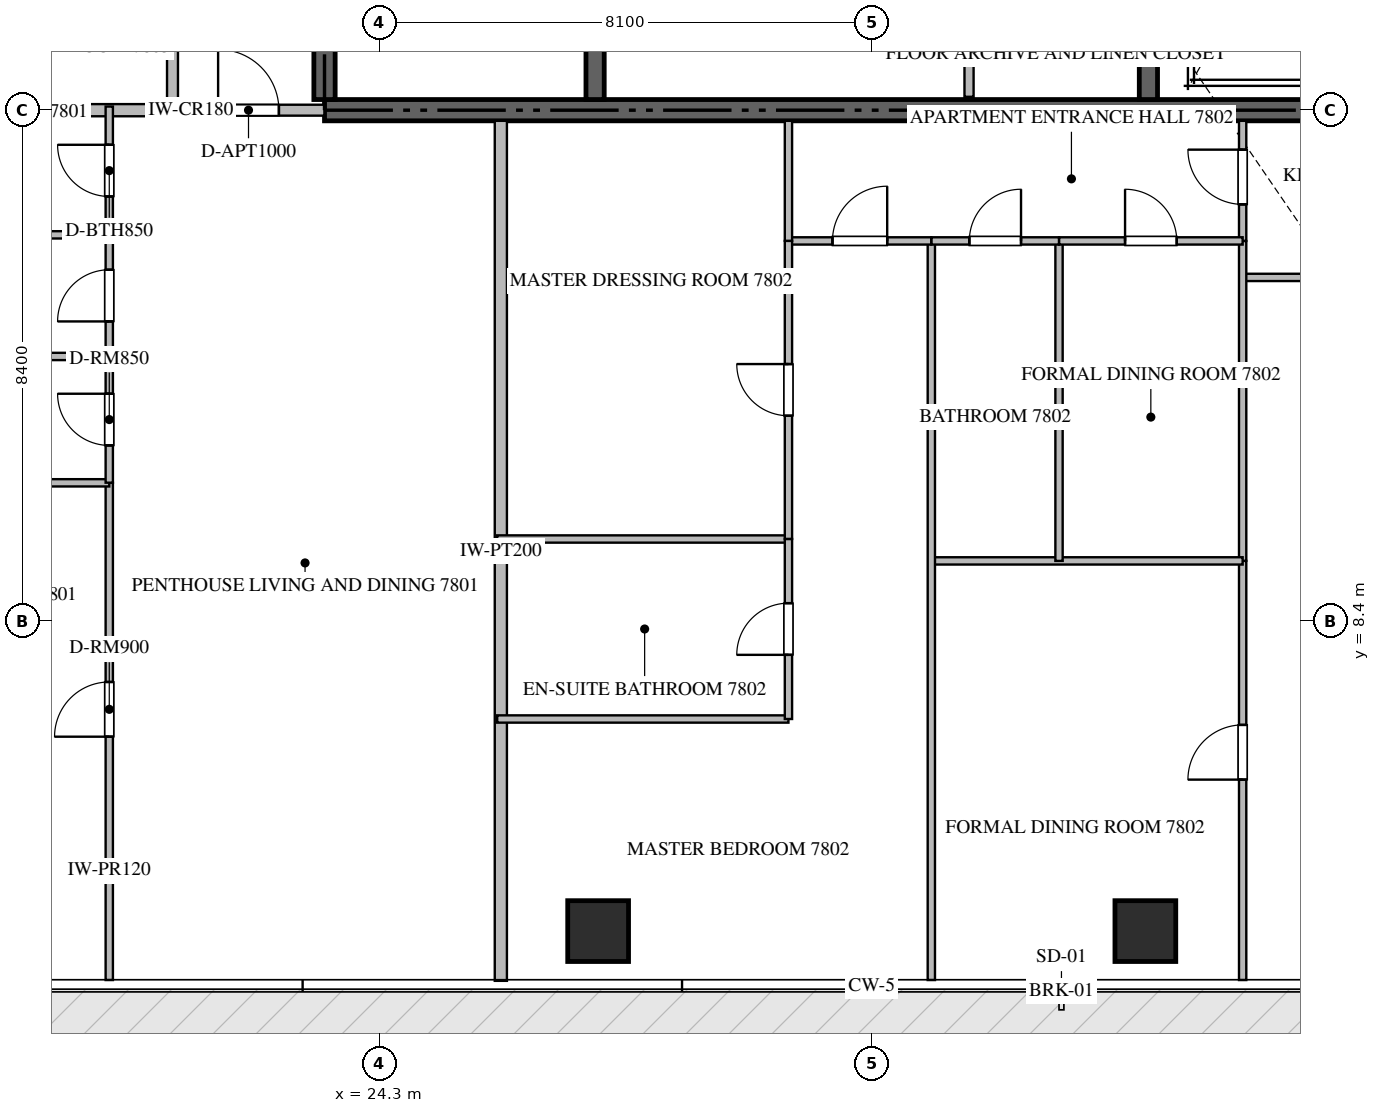
"""IFC4 building model, lengths in metres.
Left out: names, types, materials, properties, quantities, classifications, styles, units other than length and angle.
Written with IfcOpenShell. Run it as: python <this file> out.ifc"""

import sys

from ifc_helpers import new_model, si_unit, direction, frame, frame_2d, origin, origin_2d, place, context, subcontext, project, spatial, rectangle, extrude, source, transform, mapped, element, fill, save


model = new_model("IFC4")
c1 = context("Model", 3, precision=1e-05, world=origin(), true_north=direction((0.0, 1.0)))
c2 = subcontext(c1, "Body", "Model", "MODEL_VIEW")
j1 = project(units=[si_unit("LENGTHUNIT", "METRE"), si_unit("PLANEANGLEUNIT", "RADIAN")], contexts=[c1])
p1 = place(None, origin())
s1 = spatial("IfcSite", under=j1, at=p1, CompositionType="ELEMENT")
p2 = place(p1, origin())
s2 = spatial("IfcBuilding", under=s1, at=p2, CompositionType="ELEMENT")
p3 = place(p2, frame((0.0, 0.0, 313.7)))
s3 = spatial("IfcBuildingStorey", under=s2, at=p3, CompositionType="ELEMENT", Elevation=313.7)
p4 = place(p3, frame((23.4, 16.8, -0.26), z_axis=(0.0, 0.0, 1.0), x_axis=(1.0, 0.0, 0.0)))
e1 = element("IfcWall", 1, at=p4, inside=s3, PredefinedType="SHEAR", context=c2, shape_type="SweptSolid", body=[
    extrude(rectangle(XDim=18.0, YDim=0.35, at=frame_2d((9.0, 0.0))), origin(), (0.0, 0.0, 1.0), 4.048),
])
p5 = place(p3, frame((23.4, 16.975, -0.26), z_axis=(0.0, 0.0, 1.0), x_axis=(0.0, 1.0, 0.0)))
e2 = element("IfcWall", 2, at=p5, inside=s3, PredefinedType="SHEAR", context=c2, shape_type="SweptSolid", body=[
    extrude(rectangle(XDim=4.875, YDim=0.35, at=frame_2d((2.438, 0.0))), origin(), (0.0, 0.0, 1.0), 4.048),
])
p6 = place(p3, frame((27.85, 16.975, -0.26), z_axis=(0.0, 0.0, 1.0), x_axis=(0.0, 1.0, 0.0)))
e3 = element("IfcWall", 3, at=p6, inside=s3, PredefinedType="SHEAR", context=c2, shape_type="SweptSolid", body=[
    extrude(rectangle(XDim=4.875, YDim=0.3, at=frame_2d((2.438, 0.0))), origin(), (0.0, 0.0, 1.0), 4.048),
])
p7 = place(p3, frame((36.95, 16.975, -0.26), z_axis=(0.0, 0.0, 1.0), x_axis=(0.0, 1.0, 0.0)))
e4 = element("IfcWall", 4, at=p7, inside=s3, PredefinedType="SHEAR", context=c2, shape_type="SweptSolid", body=[
    extrude(rectangle(XDim=8.375, YDim=0.3, at=frame_2d((4.188, 0.0))), origin(), (0.0, 0.0, 1.0), 4.048),
])
m1 = source(origin(), c2, "Body", "SweptSolid", [
    extrude(rectangle(XDim=1.0, YDim=1.0, at=origin_2d()), origin(), (0.0, 0.0, 1.0), 4.05),
])
for number, where, z_axis, x_axis in (
    (5, (27.9, 3.3, -0.26), (0.0, 0.0, 1.0), (1.0, 0.0, 0.0)),
    (6, (36.9, 3.3, -0.26), (0.0, 0.0, 1.0), (1.0, 0.0, 0.0)),
):
    element("IfcColumn", number, at=place(p3, frame(where, z_axis=z_axis, x_axis=x_axis)), inside=s3, PredefinedType="COLUMN", context=c2, shape_type="MappedRepresentation", body=[
        mapped(m1, transform((0.0, 0.0, 0.0), scale=1.0)),
    ])
p8 = place(p3, frame((34.0, 17.02, 0.0), z_axis=(0.0, 0.0, 1.0), x_axis=(0.0, 1.0, 0.0)))
e7 = element("IfcWall", 7, at=p8, inside=s3, PredefinedType="PARTITIONING", context=c2, shape_type="SweptSolid", body=[
    extrude(rectangle(XDim=2.73, YDim=0.15, at=frame_2d((1.365, 0.0))), origin(), (0.0, 0.0, 1.0), 3.79),
])
p9 = place(p3, frame((26.3, 2.482, 0.0), z_axis=(0.0, 0.0, 1.0), x_axis=(0.0, 1.0, 0.0)))
e8 = element("IfcWall", 8, at=p9, inside=s3, PredefinedType="PARTITIONING", context=c2, shape_type="SweptSolid", body=[
    extrude(rectangle(XDim=14.143, YDim=0.2, at=frame_2d((7.072, 0.0))), origin(), (0.0, 0.0, 1.0), 3.79),
])
p10 = place(p3, frame((9.282, 16.8, 0.0), z_axis=(0.0, 0.0, 1.0), x_axis=(1.0, 0.0, 0.0)))
e9 = element("IfcWall", 9, at=p10, inside=s3, PredefinedType="PARTITIONING", context=c2, shape_type="SweptSolid", body=[
    extrude(rectangle(XDim=11.618, YDim=0.2, at=frame_2d((5.809, 0.0))), origin(), (0.0, 0.0, 1.0), 3.79),
])
p11 = place(p3, frame((20.902, 16.8, 0.0), z_axis=(0.0, 0.0, 1.0), x_axis=(1.0, 0.0, 0.0)))
e10 = element("IfcWall", 10, at=p11, inside=s3, PredefinedType="PARTITIONING", context=c2, shape_type="SweptSolid", body=[
    extrude(rectangle(XDim=2.496, YDim=0.18, at=frame_2d((1.248, 0.0))), origin(), (0.0, 0.0, 1.0), 3.79),
])
p12 = place(p11, frame((0.748, 0.0, 0.0)))
e11 = element("IfcOpeningElement", 11, at=p12, cuts=e10, PredefinedType="OPENING", context=c2, shape_type="SweptSolid", body=[
    extrude(rectangle(XDim=1.0, YDim=2.15, at=frame_2d((0.5, 1.075))), frame((0.0, 0.1, 0.0), z_axis=(0.0, -1.0, 0.0), x_axis=(1.0, 0.0, 0.0)), (0.0, 0.0, 1.0), 0.2),
])
p13 = place(p3, frame((20.9, 16.8, 0.0), z_axis=(0.0, 0.0, 1.0), x_axis=(0.0, 1.0, 0.0)))
e12 = element("IfcWall", 12, at=p13, inside=s3, PredefinedType="PARTITIONING", context=c2, shape_type="SweptSolid", body=[
    extrude(rectangle(XDim=16.8, YDim=0.18, at=frame_2d((8.4, 0.0))), origin(), (0.0, 0.0, 1.0), 3.79),
])
p14 = place(p13, frame((4.503, 0.0, 0.0)))
e13 = element("IfcOpeningElement", 13, at=p14, cuts=e12, PredefinedType="OPENING", context=c2, shape_type="SweptSolid", body=[
    extrude(rectangle(XDim=1.0, YDim=2.15, at=frame_2d((0.5, 1.075))), frame((0.0, 0.1, 0.0), z_axis=(0.0, -1.0, 0.0), x_axis=(1.0, 0.0, 0.0)), (0.0, 0.0, 1.0), 0.2),
])
p15 = place(p13, frame((8.706, 0.0, 0.0)))
e14 = element("IfcOpeningElement", 14, at=p15, cuts=e12, PredefinedType="OPENING", context=c2, shape_type="SweptSolid", body=[
    extrude(rectangle(XDim=1.0, YDim=2.15, at=frame_2d((0.5, 1.075))), frame((0.0, 0.1, 0.0), z_axis=(0.0, -1.0, 0.0), x_axis=(1.0, 0.0, 0.0)), (0.0, 0.0, 1.0), 0.2),
])
p16 = place(p3, frame((19.86, 2.495, 0.0), z_axis=(0.0, 0.0, 1.0), x_axis=(0.0, 1.0, 0.0)))
e15 = element("IfcWall", 15, at=p16, inside=s3, PredefinedType="PARTITIONING", context=c2, shape_type="SweptSolid", body=[
    extrude(rectangle(XDim=8.177, YDim=0.12, at=frame_2d((4.088, 0.0))), origin(), (0.0, 0.0, 1.0), 3.79),
])
p17 = place(p16, frame((4.002, 0.0, 0.0)))
e16 = element("IfcOpeningElement", 16, at=p17, cuts=e15, PredefinedType="OPENING", context=c2, shape_type="SweptSolid", body=[
    extrude(rectangle(XDim=0.9, YDim=2.1, at=frame_2d((0.45, 1.05))), frame((0.0, 0.07, 0.0), z_axis=(0.0, -1.0, 0.0), x_axis=(1.0, 0.0, 0.0)), (0.0, 0.0, 1.0), 0.14),
])
p18 = place(p3, frame((9.295, 10.672, 0.0), z_axis=(0.0, 0.0, 1.0), x_axis=(1.0, 0.0, 0.0)))
e17 = element("IfcWall", 17, at=p18, inside=s3, PredefinedType="PARTITIONING", context=c2, shape_type="SweptSolid", body=[
    extrude(rectangle(XDim=10.565, YDim=0.12, at=frame_2d((5.283, 0.0))), origin(), (0.0, 0.0, 1.0), 3.292),
])
p19 = place(p3, frame((9.295, 12.75, 0.0), z_axis=(0.0, 0.0, 1.0), x_axis=(1.0, 0.0, 0.0)))
e18 = element("IfcWall", 18, at=p19, inside=s3, PredefinedType="PARTITIONING", context=c2, shape_type="SweptSolid", body=[
    extrude(rectangle(XDim=10.565, YDim=0.12, at=frame_2d((5.283, 0.0))), origin(), (0.0, 0.0, 1.0), 3.79),
])
p20 = place(p3, frame((16.66, 14.75, 0.0), z_axis=(0.0, 0.0, 1.0), x_axis=(1.0, 0.0, 0.0)))
e19 = element("IfcWall", 19, at=p20, inside=s3, PredefinedType="PARTITIONING", context=c2, shape_type="SweptSolid", body=[
    extrude(rectangle(XDim=3.2, YDim=0.12, at=frame_2d((1.6, 0.0))), origin(), (0.0, 0.0, 1.0), 3.79),
])
p21 = place(p3, frame((19.86, 10.674, 0.0), z_axis=(0.0, 0.0, 1.0), x_axis=(0.0, 1.0, 0.0)))
e20 = element("IfcWall", 20, at=p21, inside=s3, PredefinedType="PARTITIONING", context=c2, shape_type="SweptSolid", body=[
    extrude(rectangle(XDim=2.076, YDim=0.12, at=frame_2d((1.038, 0.0))), origin(), (0.0, 0.0, 1.0), 3.79),
])
p22 = place(p21, frame((0.613, 0.0, 0.0)))
e21 = element("IfcOpeningElement", 21, at=p22, cuts=e20, PredefinedType="OPENING", context=c2, shape_type="SweptSolid", body=[
    extrude(rectangle(XDim=0.85, YDim=2.1, at=frame_2d((0.425, 1.05))), frame((0.0, 0.07, 0.0), z_axis=(0.0, -1.0, 0.0), x_axis=(1.0, 0.0, 0.0)), (0.0, 0.0, 1.0), 0.14),
])
p23 = place(p3, frame((19.86, 12.752, 0.0), z_axis=(0.0, 0.0, 1.0), x_axis=(0.0, 1.0, 0.0)))
e22 = element("IfcWall", 22, at=p23, inside=s3, PredefinedType="PARTITIONING", context=c2, shape_type="SweptSolid", body=[
    extrude(rectangle(XDim=1.998, YDim=0.12, at=frame_2d((0.999, 0.0))), origin(), (0.0, 0.0, 1.0), 3.79),
])
p24 = place(p23, frame((0.574, 0.0, 0.0)))
e23 = element("IfcOpeningElement", 23, at=p24, cuts=e22, PredefinedType="OPENING", context=c2, shape_type="SweptSolid", body=[
    extrude(rectangle(XDim=0.85, YDim=2.1, at=frame_2d((0.425, 1.05))), frame((0.0, 0.07, 0.0), z_axis=(0.0, -1.0, 0.0), x_axis=(1.0, 0.0, 0.0)), (0.0, 0.0, 1.0), 0.14),
])
p25 = place(p3, frame((19.86, 14.752, 0.0), z_axis=(0.0, 0.0, 1.0), x_axis=(0.0, 1.0, 0.0)))
e24 = element("IfcWall", 24, at=p25, inside=s3, PredefinedType="PARTITIONING", context=c2, shape_type="SweptSolid", body=[
    extrude(rectangle(XDim=2.108, YDim=0.12, at=frame_2d((1.054, 0.0))), origin(), (0.0, 0.0, 1.0), 3.79),
])
p26 = place(p25, frame((0.629, 0.0, 0.0)))
e25 = element("IfcOpeningElement", 25, at=p26, cuts=e24, PredefinedType="OPENING", context=c2, shape_type="SweptSolid", body=[
    extrude(rectangle(XDim=0.85, YDim=2.1, at=frame_2d((0.425, 1.05))), frame((0.0, 0.07, 0.0), z_axis=(0.0, -1.0, 0.0), x_axis=(1.0, 0.0, 0.0)), (0.0, 0.0, 1.0), 0.14),
])
p27 = place(p3, frame((38.5, 14.05, 0.0), z_axis=(0.0, 0.0, 1.0), x_axis=(1.0, 0.0, 0.0)))
e26 = element("IfcWall", 26, at=p27, inside=s3, PredefinedType="PARTITIONING", context=c2, shape_type="SweptSolid", body=[
    extrude(rectangle(XDim=2.85, YDim=0.12, at=frame_2d((1.425, 0.0))), origin(), (0.0, 0.0, 1.0), 3.79),
])
p28 = place(p27, frame((1.0, 0.0, 0.0)))
e27 = element("IfcOpeningElement", 27, at=p28, cuts=e26, PredefinedType="OPENING", context=c2, shape_type="SweptSolid", body=[
    extrude(rectangle(XDim=0.85, YDim=2.1, at=frame_2d((0.425, 1.05))), frame((0.0, 0.07, 0.0), z_axis=(0.0, -1.0, 0.0), x_axis=(1.0, 0.0, 0.0)), (0.0, 0.0, 1.0), 0.14),
])
p29 = place(p3, frame((38.5, 14.65, 0.0), z_axis=(0.0, 0.0, 1.0), x_axis=(0.0, 1.0, 0.0)))
e28 = element("IfcWall", 28, at=p29, inside=s3, PredefinedType="PARTITIONING", context=c2, shape_type="SweptSolid", body=[
    extrude(rectangle(XDim=1.975, YDim=0.12, at=frame_2d((0.988, 0.0))), origin(), (0.0, 0.0, 1.0), 3.79),
])
p30 = place(p29, frame((0.601, 0.0, 0.0)))
e29 = element("IfcOpeningElement", 29, at=p30, cuts=e28, PredefinedType="OPENING", context=c2, shape_type="SweptSolid", body=[
    extrude(rectangle(XDim=0.9, YDim=2.1, at=frame_2d((0.45, 1.05))), frame((0.0, 0.07, 0.0), z_axis=(0.0, -1.0, 0.0), x_axis=(1.0, 0.0, 0.0)), (0.0, 0.0, 1.0), 0.14),
])
p31 = place(p3, frame((38.5, 2.495, 0.0), z_axis=(0.0, 0.0, 1.0), x_axis=(0.0, 1.0, 0.0)))
e30 = element("IfcWall", 30, at=p31, inside=s3, PredefinedType="PARTITIONING", context=c2, shape_type="SweptSolid", body=[
    extrude(rectangle(XDim=6.893, YDim=0.12, at=frame_2d((3.446, 0.0))), origin(), (0.0, 0.0, 1.0), 3.79),
])
p32 = place(p31, frame((3.296, 0.0, 0.0)))
e31 = element("IfcOpeningElement", 31, at=p32, cuts=e30, PredefinedType="OPENING", context=c2, shape_type="SweptSolid", body=[
    extrude(rectangle(XDim=0.9, YDim=2.1, at=frame_2d((0.45, 1.05))), frame((0.0, 0.07, 0.0), z_axis=(0.0, -1.0, 0.0), x_axis=(1.0, 0.0, 0.0)), (0.0, 0.0, 1.0), 0.14),
])
p33 = place(p3, frame((38.5, 9.39, 0.0), z_axis=(0.0, 0.0, 1.0), x_axis=(0.0, 1.0, 0.0)))
e32 = element("IfcWall", 32, at=p33, inside=s3, PredefinedType="PARTITIONING", context=c2, shape_type="SweptSolid", body=[
    extrude(rectangle(XDim=5.258, YDim=0.12, at=frame_2d((2.629, 0.0))), origin(), (0.0, 0.0, 1.0), 3.79),
])
p34 = place(p3, frame((33.38, 9.388, 0.0), z_axis=(0.0, 0.0, 1.0), x_axis=(1.0, 0.0, 0.0)))
e33 = element("IfcWall", 33, at=p34, inside=s3, PredefinedType="PARTITIONING", context=c2, shape_type="SweptSolid", body=[
    extrude(rectangle(XDim=5.12, YDim=0.12, at=frame_2d((2.56, 0.0))), origin(), (0.0, 0.0, 1.0), 3.79),
])
p35 = place(p3, frame((33.38, 2.495, 0.0), z_axis=(0.0, 0.0, 1.0), x_axis=(0.0, 1.0, 0.0)))
e34 = element("IfcWall", 34, at=p35, inside=s3, PredefinedType="PARTITIONING", context=c2, shape_type="SweptSolid", body=[
    extrude(rectangle(XDim=12.155, YDim=0.12, at=frame_2d((6.077, 0.0))), origin(), (0.0, 0.0, 1.0), 3.79),
])
p36 = place(p3, frame((35.48, 9.388, 0.0), z_axis=(0.0, 0.0, 1.0), x_axis=(0.0, 1.0, 0.0)))
e35 = element("IfcWall", 35, at=p36, inside=s3, PredefinedType="PARTITIONING", context=c2, shape_type="SweptSolid", body=[
    extrude(rectangle(XDim=5.262, YDim=0.12, at=frame_2d((2.631, 0.0))), origin(), (0.0, 0.0, 1.0), 3.79),
])
p37 = place(p3, frame((33.38, 14.65, 0.0), z_axis=(0.0, 0.0, 1.0), x_axis=(1.0, 0.0, 0.0)))
e36 = element("IfcWall", 36, at=p37, inside=s3, PredefinedType="PARTITIONING", context=c2, shape_type="SweptSolid", body=[
    extrude(rectangle(XDim=2.1, YDim=0.12, at=frame_2d((1.05, 0.0))), origin(), (0.0, 0.0, 1.0), 3.79),
])
p38 = place(p37, frame((0.625, 0.0, 0.0)))
e37 = element("IfcOpeningElement", 37, at=p38, cuts=e36, PredefinedType="OPENING", context=c2, shape_type="SweptSolid", body=[
    extrude(rectangle(XDim=0.85, YDim=2.1, at=frame_2d((0.425, 1.05))), frame((0.0, 0.07, 0.0), z_axis=(0.0, -1.0, 0.0), x_axis=(1.0, 0.0, 0.0)), (0.0, 0.0, 1.0), 0.14),
])
p39 = place(p3, frame((35.482, 14.65, 0.0), z_axis=(0.0, 0.0, 1.0), x_axis=(1.0, 0.0, 0.0)))
e38 = element("IfcWall", 38, at=p39, inside=s3, PredefinedType="PARTITIONING", context=c2, shape_type="SweptSolid", body=[
    extrude(rectangle(XDim=3.018, YDim=0.12, at=frame_2d((1.509, 0.0))), origin(), (0.0, 0.0, 1.0), 3.79),
])
p40 = place(p39, frame((1.084, 0.0, 0.0)))
e39 = element("IfcOpeningElement", 39, at=p40, cuts=e38, PredefinedType="OPENING", context=c2, shape_type="SweptSolid", body=[
    extrude(rectangle(XDim=0.85, YDim=2.1, at=frame_2d((0.425, 1.05))), frame((0.0, 0.07, 0.0), z_axis=(0.0, -1.0, 0.0), x_axis=(1.0, 0.0, 0.0)), (0.0, 0.0, 1.0), 0.14),
])
p41 = place(p3, frame((31.03, 14.65, 0.0), z_axis=(0.0, 0.0, 1.0), x_axis=(1.0, 0.0, 0.0)))
e40 = element("IfcWall", 40, at=p41, inside=s3, PredefinedType="PARTITIONING", context=c2, shape_type="SweptSolid", body=[
    extrude(rectangle(XDim=2.348, YDim=0.12, at=frame_2d((1.174, 0.0))), origin(), (0.0, 0.0, 1.0), 3.79),
])
p42 = place(p41, frame((0.724, 0.0, 0.0)))
e41 = element("IfcOpeningElement", 41, at=p42, cuts=e40, PredefinedType="OPENING", context=c2, shape_type="SweptSolid", body=[
    extrude(rectangle(XDim=0.9, YDim=2.1, at=frame_2d((0.45, 1.05))), frame((0.0, 0.07, 0.0), z_axis=(0.0, -1.0, 0.0), x_axis=(1.0, 0.0, 0.0)), (0.0, 0.0, 1.0), 0.14),
])
for number, where, z_axis, x_axis in (
    (42, (26.24, 6.788, 0.0), (0.0, 0.0, 1.0), (1.0, 0.0, 0.0)),
    (43, (26.24, 9.748, 0.0), (0.0, 0.0, 1.0), (1.0, 0.0, 0.0)),
):
    element("IfcWall", number, at=place(p3, frame(where, z_axis=z_axis, x_axis=x_axis)), inside=s3, PredefinedType="PARTITIONING", context=c2, shape_type="SweptSolid", body=[
        extrude(rectangle(XDim=4.79, YDim=0.12, at=frame_2d((2.395, 0.0))), origin(), (0.0, 0.0, 1.0), 3.79),
    ])
p43 = place(p3, frame((31.03, 6.788, 0.0), z_axis=(0.0, 0.0, 1.0), x_axis=(0.0, 1.0, 0.0)))
e44 = element("IfcWall", 44, at=p43, inside=s3, PredefinedType="PARTITIONING", context=c2, shape_type="SweptSolid", body=[
    extrude(rectangle(XDim=2.96, YDim=0.12, at=frame_2d((1.48, 0.0))), origin(), (0.0, 0.0, 1.0), 3.79),
])
p44 = place(p43, frame((1.055, 0.0, 0.0)))
e45 = element("IfcOpeningElement", 45, at=p44, cuts=e44, PredefinedType="OPENING", context=c2, shape_type="SweptSolid", body=[
    extrude(rectangle(XDim=0.85, YDim=2.1, at=frame_2d((0.425, 1.05))), frame((0.0, 0.07, 0.0), z_axis=(0.0, -1.0, 0.0), x_axis=(1.0, 0.0, 0.0)), (0.0, 0.0, 1.0), 0.14),
])
p45 = place(p3, frame((31.03, 9.75, 0.0), z_axis=(0.0, 0.0, 1.0), x_axis=(0.0, 1.0, 0.0)))
e46 = element("IfcWall", 46, at=p45, inside=s3, PredefinedType="PARTITIONING", context=c2, shape_type="SweptSolid", body=[
    extrude(rectangle(XDim=4.9, YDim=0.12, at=frame_2d((2.45, 0.0))), origin(), (0.0, 0.0, 1.0), 3.79),
])
p46 = place(p45, frame((2.025, 0.0, 0.0)))
e47 = element("IfcOpeningElement", 47, at=p46, cuts=e46, PredefinedType="OPENING", context=c2, shape_type="SweptSolid", body=[
    extrude(rectangle(XDim=0.85, YDim=2.1, at=frame_2d((0.425, 1.05))), frame((0.0, 0.07, 0.0), z_axis=(0.0, -1.0, 0.0), x_axis=(1.0, 0.0, 0.0)), (0.0, 0.0, 1.0), 0.14),
])
p47 = place(p3, frame((31.03, 14.652, 0.0), z_axis=(0.0, 0.0, 1.0), x_axis=(0.0, 1.0, 0.0)))
e48 = element("IfcWall", 48, at=p47, inside=s3, PredefinedType="PARTITIONING", context=c2, shape_type="SweptSolid", body=[
    extrude(rectangle(XDim=1.973, YDim=0.12, at=frame_2d((0.986, 0.0))), origin(), (0.0, 0.0, 1.0), 3.79),
])
m2 = source(origin(), c2, "Body", "SweptSolid", [
    extrude(rectangle(XDim=1.0, YDim=2.15, at=frame_2d((0.5, 1.075))), frame((0.0, 0.025, 0.0), z_axis=(0.0, -1.0, 0.0), x_axis=(1.0, 0.0, 0.0)), (0.0, 0.0, 1.0), 0.05),
])
p48 = place(p12, origin())
e49 = element("IfcDoor", 49, at=p48, inside=s3, OperationType="SINGLE_SWING_LEFT", PredefinedType="DOOR", context=c2, shape_type="MappedRepresentation", body=[
    mapped(m2, transform((0.0, 0.0, 0.0), scale=1.0)),
])
fill(e11, e49)
m3 = source(origin(), c2, "Body", "SweptSolid", [
    extrude(rectangle(XDim=0.9, YDim=2.1, at=frame_2d((0.45, 1.05))), frame((0.0, 0.025, 0.0), z_axis=(0.0, -1.0, 0.0), x_axis=(1.0, 0.0, 0.0)), (0.0, 0.0, 1.0), 0.05),
])
p49 = place(p17, origin())
e50 = element("IfcDoor", 50, at=p49, inside=s3, OperationType="SINGLE_SWING_LEFT", PredefinedType="DOOR", context=c2, shape_type="MappedRepresentation", body=[
    mapped(m3, transform((0.0, 0.0, 0.0), scale=1.0)),
])
fill(e16, e50)
m4 = source(origin(), c2, "Body", "SweptSolid", [
    extrude(rectangle(XDim=0.85, YDim=2.1, at=frame_2d((0.425, 1.05))), frame((0.0, 0.025, 0.0), z_axis=(0.0, -1.0, 0.0), x_axis=(1.0, 0.0, 0.0)), (0.0, 0.0, 1.0), 0.05),
])
p50 = place(p22, origin())
e51 = element("IfcDoor", 51, at=p50, inside=s3, OperationType="SINGLE_SWING_RIGHT", PredefinedType="DOOR", context=c2, shape_type="MappedRepresentation", body=[
    mapped(m4, transform((0.0, 0.0, 0.0), scale=1.0)),
])
fill(e21, e51)
p51 = place(p24, origin())
e52 = element("IfcDoor", 52, at=p51, inside=s3, OperationType="SINGLE_SWING_LEFT", PredefinedType="DOOR", context=c2, shape_type="MappedRepresentation", body=[
    mapped(m4, transform((0.0, 0.0, 0.0), scale=1.0)),
])
fill(e23, e52)
p52 = place(p26, origin())
e53 = element("IfcDoor", 53, at=p52, inside=s3, OperationType="SINGLE_SWING_RIGHT", PredefinedType="DOOR", context=c2, shape_type="MappedRepresentation", body=[
    mapped(m4, transform((0.0, 0.0, 0.0), scale=1.0)),
])
fill(e25, e53)
p53 = place(p30, origin())
e54 = element("IfcDoor", 54, at=p53, inside=s3, OperationType="SINGLE_SWING_RIGHT", PredefinedType="DOOR", context=c2, shape_type="MappedRepresentation", body=[
    mapped(m3, transform((0.0, 0.0, 0.0), scale=1.0)),
])
fill(e29, e54)
p54 = place(p32, origin())
e55 = element("IfcDoor", 55, at=p54, inside=s3, OperationType="SINGLE_SWING_LEFT", PredefinedType="DOOR", context=c2, shape_type="MappedRepresentation", body=[
    mapped(m3, transform((0.0, 0.0, 0.0), scale=1.0)),
])
fill(e31, e55)
p55 = place(p38, origin())
e56 = element("IfcDoor", 56, at=p55, inside=s3, OperationType="SINGLE_SWING_RIGHT", PredefinedType="DOOR", context=c2, shape_type="MappedRepresentation", body=[
    mapped(m4, transform((0.0, 0.0, 0.0), scale=1.0)),
])
fill(e37, e56)
p56 = place(p40, origin())
e57 = element("IfcDoor", 57, at=p56, inside=s3, OperationType="SINGLE_SWING_LEFT", PredefinedType="DOOR", context=c2, shape_type="MappedRepresentation", body=[
    mapped(m4, transform((0.0, 0.0, 0.0), scale=1.0)),
])
fill(e39, e57)
p57 = place(p42, origin())
e58 = element("IfcDoor", 58, at=p57, inside=s3, OperationType="SINGLE_SWING_RIGHT", PredefinedType="DOOR", context=c2, shape_type="MappedRepresentation", body=[
    mapped(m3, transform((0.0, 0.0, 0.0), scale=1.0)),
])
fill(e41, e58)
p58 = place(p44, origin())
e59 = element("IfcDoor", 59, at=p58, inside=s3, OperationType="SINGLE_SWING_LEFT", PredefinedType="DOOR", context=c2, shape_type="MappedRepresentation", body=[
    mapped(m4, transform((0.0, 0.0, 0.0), scale=1.0)),
])
fill(e45, e59)
p59 = place(p46, origin())
e60 = element("IfcDoor", 60, at=p59, inside=s3, OperationType="SINGLE_SWING_RIGHT", PredefinedType="DOOR", context=c2, shape_type="MappedRepresentation", body=[
    mapped(m4, transform((0.0, 0.0, 0.0), scale=1.0)),
])
fill(e47, e60)
save(model, sys.argv[1])
